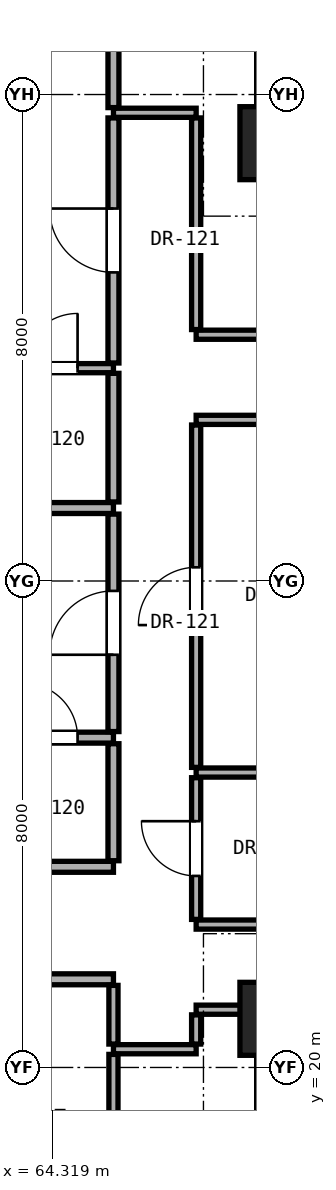
"""IFC4 building model, lengths in metres.
Left out: names, types, materials, properties, quantities, classifications, styles, units other than length and angle.
Written with IfcOpenShell. Run it as: python <this file> out.ifc"""

import sys

from ifc_helpers import new_model, si_unit, direction, frame, frame_2d, origin, origin_2d, place, context, subcontext, project, spatial, rectangle, extrude, element, fill, save


model = new_model("IFC4")
c1 = context("Model", 3, precision=1e-05, world=origin(), true_north=direction((0.0, 1.0)))
c2 = subcontext(c1, "Body", "Model", "MODEL_VIEW")
j1 = project(units=[si_unit("LENGTHUNIT", "METRE"), si_unit("PLANEANGLEUNIT", "RADIAN")], contexts=[c1])
p1 = place(None, origin())
s1 = spatial("IfcSite", under=j1, at=p1, CompositionType="ELEMENT")
p2 = place(p1, origin())
s2 = spatial("IfcBuilding", under=s1, at=p2, CompositionType="ELEMENT")
p3 = place(p2, frame((0.0, 0.0, 95.0)))
s3 = spatial("IfcBuildingStorey", under=s2, at=p3, CompositionType="ELEMENT", Elevation=95.0)
for number, where, z_axis, x_axis in (
    (1, (68.0, 20.8, 0.0), (0.0, 0.0, 1.0), (1.0, 0.0, 0.0)),
    (2, (68.0, 35.2, 0.0), (0.0, 0.0, 1.0), (1.0, 0.0, 0.0)),
):
    element("IfcColumn", number, at=place(p3, frame(where, z_axis=z_axis, x_axis=x_axis)), inside=s3, PredefinedType="COLUMN", context=c2, shape_type="SweptSolid", body=[
        extrude(rectangle(XDim=1.2, YDim=1.2, at=origin_2d()), origin(), (0.0, 0.0, 1.0), 3.3),
    ])
for number, where, z_axis, x_axis in (
    (3, (68.0, 35.2, 0.0), (0.0, 0.0, 1.0), (0.0, 1.0, 0.0)),
    (4, (68.0, 15.2, 0.0), (0.0, 0.0, 1.0), (0.0, 1.0, 0.0)),
):
    element("IfcWall", number, at=place(p3, frame(where, z_axis=z_axis, x_axis=x_axis)), inside=s3, PredefinedType="SHEAR", context=c2, shape_type="SweptSolid", body=[
        extrude(rectangle(XDim=5.6, YDim=0.65, at=frame_2d((2.8, 0.0))), origin(), (0.0, 0.0, 1.0), 3.08),
    ])
p4 = place(p3, frame((65.32, 20.3, 0.0), z_axis=(0.0, 0.0, 1.0), x_axis=(1.0, 0.0, 0.0)))
e5 = element("IfcWall", 5, at=p4, inside=s3, PredefinedType="PARTITIONING", context=c2, shape_type="SweptSolid", body=[
    extrude(rectangle(XDim=1.36, YDim=0.15, at=frame_2d((0.68, 0.0))), origin(), (0.0, 0.0, 1.0), 3.08),
])
p5 = place(p3, frame((66.68, 20.95, 0.0), z_axis=(0.0, 0.0, 1.0), x_axis=(1.0, 0.0, 0.0)))
e6 = element("IfcWall", 6, at=p5, inside=s3, PredefinedType="PARTITIONING", context=c2, shape_type="SweptSolid", body=[
    extrude(rectangle(XDim=1.0, YDim=0.15, at=frame_2d((0.5, 0.0))), origin(), (0.0, 0.0, 1.0), 2.472),
])
p6 = place(p3, frame((58.261, 21.45, 0.0), z_axis=(0.0, 0.0, 1.0), x_axis=(1.0, 0.0, 0.0)))
e7 = element("IfcWall", 7, at=p6, inside=s3, PredefinedType="PARTITIONING", context=c2, shape_type="SweptSolid", body=[
    extrude(rectangle(XDim=7.059, YDim=0.18, at=frame_2d((3.529, 0.0))), origin(), (0.0, 0.0, 1.0), 2.105),
])
p7 = place(p6, frame((4.628, 0.0, 0.0)))
e8 = element("IfcOpeningElement", 8, at=p7, cuts=e7, PredefinedType="OPENING", context=c2, shape_type="SweptSolid", body=[
    extrude(rectangle(XDim=0.85, YDim=2.01, at=frame_2d((0.425, 1.005))), frame((0.0, 0.1, 0.0), z_axis=(0.0, -1.0, 0.0), x_axis=(1.0, 0.0, 0.0)), (0.0, 0.0, 1.0), 0.2),
])
p8 = place(p3, frame((66.68, 22.35, 0.0), z_axis=(0.0, 0.0, 1.0), x_axis=(1.0, 0.0, 0.0)))
e9 = element("IfcWall", 9, at=p8, inside=s3, PredefinedType="PARTITIONING", context=c2, shape_type="SweptSolid", body=[
    extrude(rectangle(XDim=19.5, YDim=0.15, at=frame_2d((9.75, 0.0))), origin(), (0.0, 0.0, 1.0), 2.145),
])
p9 = place(p8, frame((11.99, 0.0, 0.0)))
e10 = element("IfcOpeningElement", 10, at=p9, cuts=e9, PredefinedType="OPENING", context=c2, shape_type="SweptSolid", body=[
    extrude(rectangle(XDim=0.85, YDim=2.01, at=frame_2d((0.425, 1.005))), frame((0.0, 0.085, 0.0), z_axis=(0.0, -1.0, 0.0), x_axis=(1.0, 0.0, 0.0)), (0.0, 0.0, 1.0), 0.17),
])
p10 = place(p3, frame((32.1, 23.3, 0.0), z_axis=(0.0, 0.0, 1.0), x_axis=(1.0, 0.0, 0.0)))
e11 = element("IfcWall", 11, at=p10, inside=s3, PredefinedType="PARTITIONING", context=c2, shape_type="SweptSolid", body=[
    extrude(rectangle(XDim=33.22, YDim=0.18, at=frame_2d((16.61, 0.0))), origin(), (0.0, 0.0, 1.0), 2.145),
])
p11 = place(p10, frame((11.705, 0.0, 0.0)))
e12 = element("IfcOpeningElement", 12, at=p11, cuts=e11, PredefinedType="OPENING", context=c2, shape_type="SweptSolid", body=[
    extrude(rectangle(XDim=0.85, YDim=2.01, at=frame_2d((0.425, 1.005))), frame((0.0, 0.1, 0.0), z_axis=(0.0, -1.0, 0.0), x_axis=(1.0, 0.0, 0.0)), (0.0, 0.0, 1.0), 0.2),
])
p12 = place(p10, frame((23.105, 0.0, 0.0)))
e13 = element("IfcOpeningElement", 13, at=p12, cuts=e11, PredefinedType="OPENING", context=c2, shape_type="SweptSolid", body=[
    extrude(rectangle(XDim=0.85, YDim=2.01, at=frame_2d((0.425, 1.005))), frame((0.0, 0.1, 0.0), z_axis=(0.0, -1.0, 0.0), x_axis=(1.0, 0.0, 0.0)), (0.0, 0.0, 1.0), 0.2),
])
p13 = place(p3, frame((66.68, 24.85, 0.0), z_axis=(0.0, 0.0, 1.0), x_axis=(1.0, 0.0, 0.0)))
e14 = element("IfcWall", 14, at=p13, inside=s3, PredefinedType="PARTITIONING", context=c2, shape_type="SweptSolid", body=[
    extrude(rectangle(XDim=3.07, YDim=0.15, at=frame_2d((1.535, 0.0))), origin(), (0.0, 0.0, 1.0), 2.145),
])
p14 = place(p3, frame((58.881, 25.424, 0.0), z_axis=(0.0, 0.0, 1.0), x_axis=(1.0, 0.0, 0.0)))
e15 = element("IfcWall", 15, at=p14, inside=s3, PredefinedType="PARTITIONING", context=c2, shape_type="SweptSolid", body=[
    extrude(rectangle(XDim=6.439, YDim=0.18, at=frame_2d((3.219, 0.0))), origin(), (0.0, 0.0, 1.0), 2.216),
])
p15 = place(p14, frame((1.744, 0.0, 0.0)))
e16 = element("IfcOpeningElement", 16, at=p15, cuts=e15, PredefinedType="OPENING", context=c2, shape_type="SweptSolid", body=[
    extrude(rectangle(XDim=0.95, YDim=2.15, at=frame_2d((0.475, 1.075))), frame((0.0, 0.1, 0.0), z_axis=(0.0, -1.0, 0.0), x_axis=(1.0, 0.0, 0.0)), (0.0, 0.0, 1.0), 0.2),
])
p16 = place(p14, frame((4.949, 0.0, 0.0)))
e17 = element("IfcOpeningElement", 17, at=p16, cuts=e15, PredefinedType="OPENING", context=c2, shape_type="SweptSolid", body=[
    extrude(rectangle(XDim=0.9, YDim=2.1, at=frame_2d((0.45, 1.05))), frame((0.0, 0.1, 0.0), z_axis=(0.0, -1.0, 0.0), x_axis=(1.0, 0.0, 0.0)), (0.0, 0.0, 1.0), 0.2),
])
p17 = place(p3, frame((58.881, 29.2, 0.0), z_axis=(0.0, 0.0, 1.0), x_axis=(1.0, 0.0, 0.0)))
e18 = element("IfcWall", 18, at=p17, inside=s3, PredefinedType="PARTITIONING", context=c2, shape_type="SweptSolid", body=[
    extrude(rectangle(XDim=6.439, YDim=0.18, at=frame_2d((3.219, 0.0))), origin(), (0.0, 0.0, 1.0), 2.216),
])
p18 = place(p3, frame((66.68, 30.65, 0.0), z_axis=(0.0, 0.0, 1.0), x_axis=(1.0, 0.0, 0.0)))
e19 = element("IfcWall", 19, at=p18, inside=s3, PredefinedType="PARTITIONING", context=c2, shape_type="SweptSolid", body=[
    extrude(rectangle(XDim=19.5, YDim=0.15, at=frame_2d((9.75, 0.0))), origin(), (0.0, 0.0, 1.0), 2.145),
])
p19 = place(p18, frame((3.795, 0.0, 0.0)))
e20 = element("IfcOpeningElement", 20, at=p19, cuts=e19, PredefinedType="OPENING", context=c2, shape_type="SweptSolid", body=[
    extrude(rectangle(XDim=0.85, YDim=2.01, at=frame_2d((0.425, 1.005))), frame((0.0, 0.085, 0.0), z_axis=(0.0, -1.0, 0.0), x_axis=(1.0, 0.0, 0.0)), (0.0, 0.0, 1.0), 0.17),
])
p20 = place(p18, frame((11.99, 0.0, 0.0)))
e21 = element("IfcOpeningElement", 21, at=p20, cuts=e19, PredefinedType="OPENING", context=c2, shape_type="SweptSolid", body=[
    extrude(rectangle(XDim=0.85, YDim=2.01, at=frame_2d((0.425, 1.005))), frame((0.0, 0.085, 0.0), z_axis=(0.0, -1.0, 0.0), x_axis=(1.0, 0.0, 0.0)), (0.0, 0.0, 1.0), 0.17),
])
p21 = place(p3, frame((58.881, 31.5, 0.0), z_axis=(0.0, 0.0, 1.0), x_axis=(1.0, 0.0, 0.0)))
e22 = element("IfcWall", 22, at=p21, inside=s3, PredefinedType="PARTITIONING", context=c2, shape_type="SweptSolid", body=[
    extrude(rectangle(XDim=6.439, YDim=0.15, at=frame_2d((3.219, 0.0))), origin(), (0.0, 0.0, 1.0), 2.216),
])
p22 = place(p21, frame((1.744, 0.0, 0.0)))
e23 = element("IfcOpeningElement", 23, at=p22, cuts=e22, PredefinedType="OPENING", context=c2, shape_type="SweptSolid", body=[
    extrude(rectangle(XDim=0.95, YDim=2.15, at=frame_2d((0.475, 1.075))), frame((0.0, 0.085, 0.0), z_axis=(0.0, -1.0, 0.0), x_axis=(1.0, 0.0, 0.0)), (0.0, 0.0, 1.0), 0.17),
])
p23 = place(p21, frame((4.949, 0.0, 0.0)))
e24 = element("IfcOpeningElement", 24, at=p23, cuts=e22, PredefinedType="OPENING", context=c2, shape_type="SweptSolid", body=[
    extrude(rectangle(XDim=0.9, YDim=2.1, at=frame_2d((0.45, 1.05))), frame((0.0, 0.085, 0.0), z_axis=(0.0, -1.0, 0.0), x_axis=(1.0, 0.0, 0.0)), (0.0, 0.0, 1.0), 0.17),
])
p24 = place(p3, frame((66.68, 32.05, 0.0), z_axis=(0.0, 0.0, 1.0), x_axis=(1.0, 0.0, 0.0)))
e25 = element("IfcWall", 25, at=p24, inside=s3, PredefinedType="PARTITIONING", context=c2, shape_type="SweptSolid", body=[
    extrude(rectangle(XDim=2.12, YDim=0.15, at=frame_2d((1.06, 0.0))), origin(), (0.0, 0.0, 1.0), 2.145),
])
p25 = place(p3, frame((65.32, 35.7, 0.0), z_axis=(0.0, 0.0, 1.0), x_axis=(1.0, 0.0, 0.0)))
e26 = element("IfcWall", 26, at=p25, inside=s3, PredefinedType="PARTITIONING", context=c2, shape_type="SweptSolid", body=[
    extrude(rectangle(XDim=1.36, YDim=0.15, at=frame_2d((0.68, 0.0))), origin(), (0.0, 0.0, 1.0), 3.08),
])
p26 = place(p3, frame((65.32, 16.837, 0.0), z_axis=(0.0, 0.0, 1.0), x_axis=(0.0, 1.0, 0.0)))
e27 = element("IfcWall", 27, at=p26, inside=s3, PredefinedType="PARTITIONING", context=c2, shape_type="SweptSolid", body=[
    extrude(rectangle(XDim=3.378, YDim=0.15, at=frame_2d((1.689, 0.0))), origin(), (0.0, 0.0, 1.0), 2.456),
])
p27 = place(p3, frame((65.32, 20.385, 0.0), z_axis=(0.0, 0.0, 1.0), x_axis=(0.0, 1.0, 0.0)))
e28 = element("IfcWall", 28, at=p27, inside=s3, PredefinedType="PARTITIONING", context=c2, shape_type="SweptSolid", body=[
    extrude(rectangle(XDim=0.965, YDim=0.15, at=frame_2d((0.482, 0.0))), origin(), (0.0, 0.0, 1.0), 2.472),
])
p28 = place(p3, frame((65.32, 23.4, 0.0), z_axis=(0.0, 0.0, 1.0), x_axis=(0.0, 1.0, 0.0)))
e29 = element("IfcWall", 29, at=p28, inside=s3, PredefinedType="PARTITIONING", context=c2, shape_type="SweptSolid", body=[
    extrude(rectangle(XDim=1.924, YDim=0.18, at=frame_2d((0.962, 0.0))), origin(), (0.0, 0.0, 1.0), 3.08),
])
p29 = place(p3, frame((65.32, 25.524, 0.0), z_axis=(0.0, 0.0, 1.0), x_axis=(0.0, 1.0, 0.0)))
e30 = element("IfcWall", 30, at=p29, inside=s3, PredefinedType="PARTITIONING", context=c2, shape_type="SweptSolid", body=[
    extrude(rectangle(XDim=3.576, YDim=0.18, at=frame_2d((1.788, 0.0))), origin(), (0.0, 0.0, 1.0), 2.299),
])
p30 = place(p29, frame((1.263, 0.0, 0.0)))
e31 = element("IfcOpeningElement", 31, at=p30, cuts=e30, PredefinedType="OPENING", context=c2, shape_type="SweptSolid", body=[
    extrude(rectangle(XDim=1.05, YDim=2.2, at=frame_2d((0.525, 1.1))), frame((0.0, 0.1, 0.0), z_axis=(0.0, -1.0, 0.0), x_axis=(1.0, 0.0, 0.0)), (0.0, 0.0, 1.0), 0.2),
])
p31 = place(p3, frame((65.32, 29.3, 0.0), z_axis=(0.0, 0.0, 1.0), x_axis=(0.0, 1.0, 0.0)))
e32 = element("IfcWall", 32, at=p31, inside=s3, PredefinedType="PARTITIONING", context=c2, shape_type="SweptSolid", body=[
    extrude(rectangle(XDim=2.115, YDim=0.18, at=frame_2d((1.058, 0.0))), origin(), (0.0, 0.0, 1.0), 3.08),
])
p32 = place(p3, frame((65.32, 31.585, 0.0), z_axis=(0.0, 0.0, 1.0), x_axis=(0.0, 1.0, 0.0)))
e33 = element("IfcWall", 33, at=p32, inside=s3, PredefinedType="PARTITIONING", context=c2, shape_type="SweptSolid", body=[
    extrude(rectangle(XDim=4.03, YDim=0.18, at=frame_2d((2.015, 0.0))), origin(), (0.0, 0.0, 1.0), 2.472),
])
p33 = place(p32, frame((1.49, 0.0, 0.0)))
e34 = element("IfcOpeningElement", 34, at=p33, cuts=e33, PredefinedType="OPENING", context=c2, shape_type="SweptSolid", body=[
    extrude(rectangle(XDim=1.05, YDim=2.2, at=frame_2d((0.525, 1.1))), frame((0.0, 0.1, 0.0), z_axis=(0.0, -1.0, 0.0), x_axis=(1.0, 0.0, 0.0)), (0.0, 0.0, 1.0), 0.2),
])
p34 = place(p3, frame((65.32, 35.785, 0.0), z_axis=(0.0, 0.0, 1.0), x_axis=(0.0, 1.0, 0.0)))
e35 = element("IfcWall", 35, at=p34, inside=s3, PredefinedType="PARTITIONING", context=c2, shape_type="SweptSolid", body=[
    extrude(rectangle(XDim=3.378, YDim=0.18, at=frame_2d((1.689, 0.0))), origin(), (0.0, 0.0, 1.0), 2.456),
])
p35 = place(p3, frame((66.68, 20.385, 0.0), z_axis=(0.0, 0.0, 1.0), x_axis=(0.0, 1.0, 0.0)))
e36 = element("IfcWall", 36, at=p35, inside=s3, PredefinedType="PARTITIONING", context=c2, shape_type="SweptSolid", body=[
    extrude(rectangle(XDim=0.48, YDim=0.15, at=frame_2d((0.24, 0.0))), origin(), (0.0, 0.0, 1.0), 2.472),
])
p36 = place(p3, frame((66.68, 22.435, 0.0), z_axis=(0.0, 0.0, 1.0), x_axis=(0.0, 1.0, 0.0)))
e37 = element("IfcWall", 37, at=p36, inside=s3, PredefinedType="PARTITIONING", context=c2, shape_type="SweptSolid", body=[
    extrude(rectangle(XDim=2.33, YDim=0.15, at=frame_2d((1.165, 0.0))), origin(), (0.0, 0.0, 1.0), 3.08),
])
p37 = place(p36, frame((0.715, 0.0, 0.0)))
e38 = element("IfcOpeningElement", 38, at=p37, cuts=e37, PredefinedType="OPENING", context=c2, shape_type="SweptSolid", body=[
    extrude(rectangle(XDim=0.9, YDim=2.1, at=frame_2d((0.45, 1.05))), frame((0.0, 0.085, 0.0), z_axis=(0.0, -1.0, 0.0), x_axis=(1.0, 0.0, 0.0)), (0.0, 0.0, 1.0), 0.17),
])
p38 = place(p3, frame((66.68, 24.935, 0.0), z_axis=(0.0, 0.0, 1.0), x_axis=(0.0, 1.0, 0.0)))
e39 = element("IfcWall", 39, at=p38, inside=s3, PredefinedType="PARTITIONING", context=c2, shape_type="SweptSolid", body=[
    extrude(rectangle(XDim=5.63, YDim=0.15, at=frame_2d((2.815, 0.0))), origin(), (0.0, 0.0, 1.0), 2.299),
])
p39 = place(p38, frame((2.34, 0.0, 0.0)))
e40 = element("IfcOpeningElement", 40, at=p39, cuts=e39, PredefinedType="OPENING", context=c2, shape_type="SweptSolid", body=[
    extrude(rectangle(XDim=0.95, YDim=2.15, at=frame_2d((0.475, 1.075))), frame((0.0, 0.085, 0.0), z_axis=(0.0, -1.0, 0.0), x_axis=(1.0, 0.0, 0.0)), (0.0, 0.0, 1.0), 0.17),
])
p40 = place(p3, frame((66.68, 32.135, 0.0), z_axis=(0.0, 0.0, 1.0), x_axis=(0.0, 1.0, 0.0)))
e41 = element("IfcWall", 41, at=p40, inside=s3, PredefinedType="PARTITIONING", context=c2, shape_type="SweptSolid", body=[
    extrude(rectangle(XDim=3.48, YDim=0.15, at=frame_2d((1.74, 0.0))), origin(), (0.0, 0.0, 1.0), 2.472),
])
p41 = place(p37, origin())
e42 = element("IfcDoor", 42, at=p41, inside=s3, OperationType="SINGLE_SWING_RIGHT", PredefinedType="DOOR", context=c2, shape_type="SweptSolid", body=[
    extrude(rectangle(XDim=0.9, YDim=2.1, at=frame_2d((0.45, 1.05))), frame((0.0, 0.025, 0.0), z_axis=(0.0, -1.0, 0.0), x_axis=(1.0, 0.0, 0.0)), (0.0, 0.0, 1.0), 0.05),
])
fill(e38, e42)
p42 = place(p30, origin())
e43 = element("IfcDoor", 43, at=p42, inside=s3, OperationType="SINGLE_SWING_LEFT", PredefinedType="DOOR", context=c2, shape_type="SweptSolid", body=[
    extrude(rectangle(XDim=1.05, YDim=2.2, at=frame_2d((0.525, 1.1))), frame((0.0, 0.025, 0.0), z_axis=(0.0, -1.0, 0.0), x_axis=(1.0, 0.0, 0.0)), (0.0, 0.0, 1.0), 0.05),
])
fill(e31, e43)
p43 = place(p16, origin())
e44 = element("IfcDoor", 44, at=p43, inside=s3, OperationType="SINGLE_SWING_LEFT", PredefinedType="DOOR", context=c2, shape_type="SweptSolid", body=[
    extrude(rectangle(XDim=0.9, YDim=2.1, at=frame_2d((0.45, 1.05))), frame((0.0, 0.025, 0.0), z_axis=(0.0, -1.0, 0.0), x_axis=(1.0, 0.0, 0.0)), (0.0, 0.0, 1.0), 0.05),
])
fill(e17, e44)
p44 = place(p33, origin())
e45 = element("IfcDoor", 45, at=p44, inside=s3, OperationType="SINGLE_SWING_RIGHT", PredefinedType="DOOR", context=c2, shape_type="SweptSolid", body=[
    extrude(rectangle(XDim=1.05, YDim=2.2, at=frame_2d((0.525, 1.1))), frame((0.0, 0.025, 0.0), z_axis=(0.0, -1.0, 0.0), x_axis=(1.0, 0.0, 0.0)), (0.0, 0.0, 1.0), 0.05),
])
fill(e34, e45)
p45 = place(p23, origin())
e46 = element("IfcDoor", 46, at=p45, inside=s3, OperationType="SINGLE_SWING_RIGHT", PredefinedType="DOOR", context=c2, shape_type="SweptSolid", body=[
    extrude(rectangle(XDim=0.9, YDim=2.1, at=frame_2d((0.45, 1.05))), frame((0.0, 0.025, 0.0), z_axis=(0.0, -1.0, 0.0), x_axis=(1.0, 0.0, 0.0)), (0.0, 0.0, 1.0), 0.05),
])
fill(e24, e46)
p46 = place(p39, origin())
e47 = element("IfcDoor", 47, at=p46, inside=s3, OperationType="SINGLE_SWING_LEFT", PredefinedType="DOOR", context=c2, shape_type="SweptSolid", body=[
    extrude(rectangle(XDim=0.95, YDim=2.15, at=frame_2d((0.475, 1.075))), frame((0.0, 0.025, 0.0), z_axis=(0.0, -1.0, 0.0), x_axis=(1.0, 0.0, 0.0)), (0.0, 0.0, 1.0), 0.05),
])
fill(e40, e47)
save(model, sys.argv[1])
